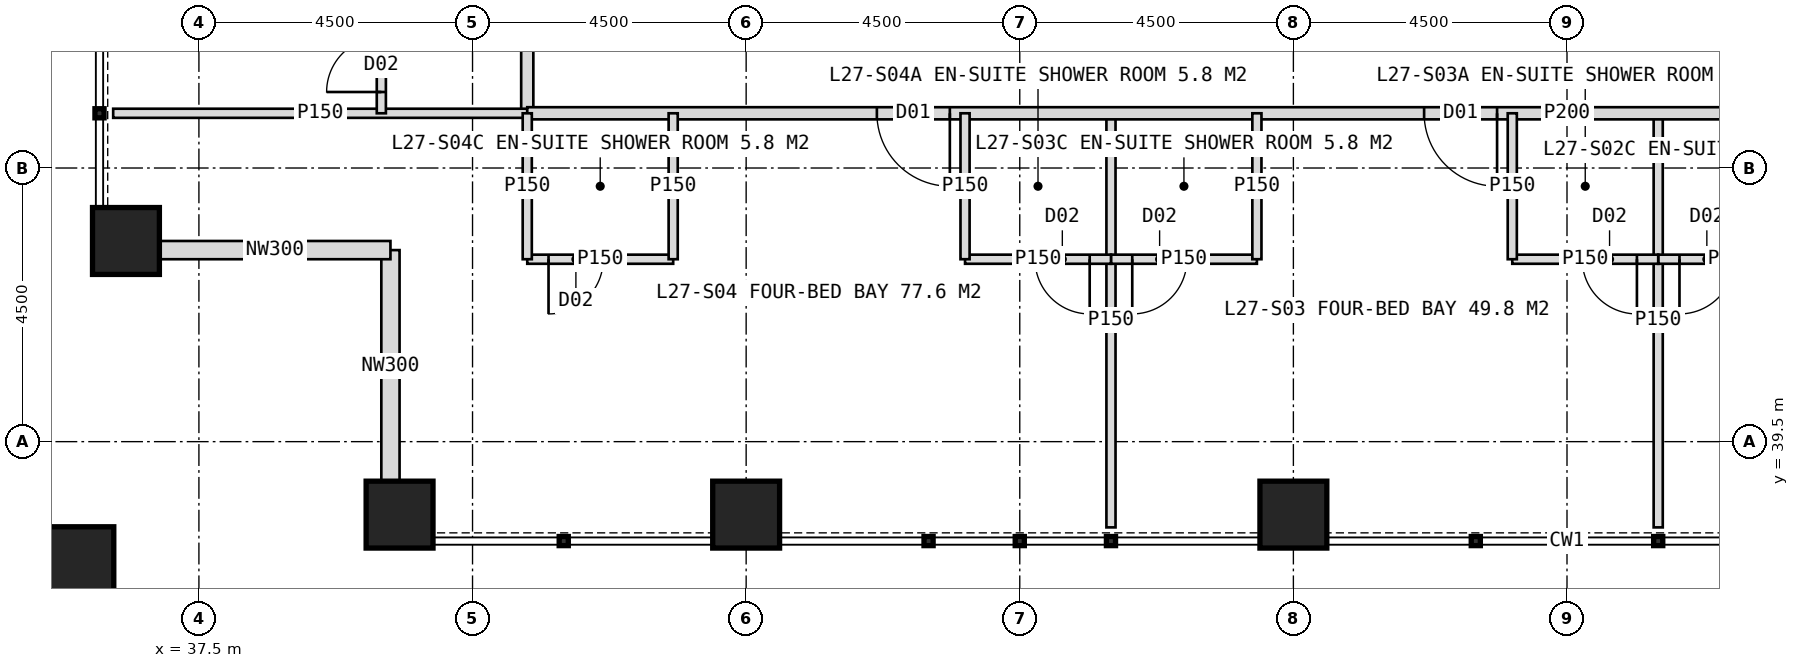
"""IFC4 building model, lengths in metres.
Left out: names, types, materials, properties, quantities, classifications, styles, units other than length and angle.
Written with IfcOpenShell. Run it as: python <this file> out.ifc"""

import sys

from ifc_helpers import new_model, si_unit, direction, frame, frame_2d, origin, origin_2d, place, context, subcontext, project, spatial, rectangle, hollow_rectangle, extrude, element, fill, save


model = new_model("IFC4")
c1 = context("Model", 3, precision=1e-05, world=origin(), true_north=direction((0.0, 1.0)))
c2 = subcontext(c1, "Body", "Model", "MODEL_VIEW")
j1 = project(units=[si_unit("LENGTHUNIT", "METRE"), si_unit("PLANEANGLEUNIT", "RADIAN")], contexts=[c1])
p1 = place(None, origin())
s1 = spatial("IfcSite", under=j1, at=p1, CompositionType="ELEMENT")
p2 = place(p1, origin())
s2 = spatial("IfcBuilding", under=s1, at=p2, CompositionType="ELEMENT")
p3 = place(p2, frame((0.0, 0.0, 116.0)))
s3 = spatial("IfcBuildingStorey", under=s2, at=p3, CompositionType="ELEMENT", Elevation=116.0)
for number, where, z_axis, x_axis in (
    (1, (40.8, 38.3, 0.0), (0.0, 0.0, 1.0), (1.0, 0.0, 0.0)),
    (2, (36.3, 42.8, 0.0), (0.0, 0.0, 1.0), (1.0, 0.0, 0.0)),
    (3, (46.5, 38.3, 0.0), (0.0, 0.0, 1.0), (1.0, 0.0, 0.0)),
    (4, (55.5, 38.3, 0.0), (0.0, 0.0, 1.0), (1.0, 0.0, 0.0)),
):
    element("IfcColumn", number, at=place(p3, frame(where, z_axis=z_axis, x_axis=x_axis)), inside=s3, PredefinedType="COLUMN", context=c2, shape_type="SweptSolid", body=[
        extrude(hollow_rectangle(XDim=1.1, YDim=1.1, WallThickness=0.1, at=origin_2d()), origin(), (0.0, 0.0, 1.0), 4.0),
    ])
p4 = place(p3, frame((35.4, 37.4, 0.0), z_axis=(0.0, 0.0, 1.0), x_axis=(1.0, 0.0, 0.0)))
e5 = element("IfcColumn", 5, at=p4, inside=s3, PredefinedType="COLUMN", context=c2, shape_type="SweptSolid", body=[
    extrude(hollow_rectangle(XDim=1.4, YDim=1.4, WallThickness=0.08, at=origin_2d()), origin(), (0.0, 0.0, 1.0), 4.0),
])
for number, where, z_axis, x_axis in (
    (6, (40.65, 38.85, 0.0), (0.0, 0.0, 1.0), (0.0, 1.0, 0.0)),
    (7, (40.65, 42.65, 0.0), (0.0, 0.0, 1.0), (-1.0, 0.0, 0.0)),
):
    element("IfcWall", number, at=place(p3, frame(where, z_axis=z_axis, x_axis=x_axis)), inside=s3, PredefinedType="ELEMENTEDWALL", context=c2, shape_type="SweptSolid", body=[
        extrude(rectangle(XDim=3.8, YDim=0.3, at=frame_2d((1.9, 0.0))), origin(), (0.0, 0.0, 1.0), 4.0),
    ])
p5 = place(p3, frame((42.9, 44.9, 0.0), z_axis=(0.0, 0.0, 1.0), x_axis=(0.0, 1.0, 0.0)))
e8 = element("IfcWall", 8, at=p5, inside=s3, PredefinedType="PARTITIONING", context=c2, shape_type="SweptSolid", body=[
    extrude(rectangle(XDim=34.2, YDim=0.2, at=frame_2d((17.1, 0.0))), origin(), (0.0, 0.0, 1.0), 3.75),
])
p6 = place(p5, frame((3.25, 0.0, 0.0)))
e9 = element("IfcOpeningElement", 9, at=p6, cuts=e8, PredefinedType="OPENING", context=c2, shape_type="SweptSolid", body=[
    extrude(rectangle(XDim=1.2, YDim=2.2, at=frame_2d((0.6, 1.1))), frame((0.0, 0.11, 0.0), z_axis=(0.0, -1.0, 0.0), x_axis=(1.0, 0.0, 0.0)), (0.0, 0.0, 1.0), 0.22),
])
p7 = place(p5, frame((10.75, 0.0, 0.0)))
e10 = element("IfcOpeningElement", 10, at=p7, cuts=e8, PredefinedType="OPENING", context=c2, shape_type="SweptSolid", body=[
    extrude(rectangle(XDim=1.2, YDim=2.2, at=frame_2d((0.6, 1.1))), frame((0.0, 0.11, 0.0), z_axis=(0.0, -1.0, 0.0), x_axis=(1.0, 0.0, 0.0)), (0.0, 0.0, 1.0), 0.22),
])
p8 = place(p5, frame((19.75, 0.0, 0.0)))
e11 = element("IfcOpeningElement", 11, at=p8, cuts=e8, PredefinedType="OPENING", context=c2, shape_type="SweptSolid", body=[
    extrude(rectangle(XDim=1.2, YDim=2.2, at=frame_2d((0.6, 1.1))), frame((0.0, 0.11, 0.0), z_axis=(0.0, -1.0, 0.0), x_axis=(1.0, 0.0, 0.0)), (0.0, 0.0, 1.0), 0.22),
])
p9 = place(p5, frame((28.75, 0.0, 0.0)))
e12 = element("IfcOpeningElement", 12, at=p9, cuts=e8, PredefinedType="OPENING", context=c2, shape_type="SweptSolid", body=[
    extrude(rectangle(XDim=1.2, YDim=2.2, at=frame_2d((0.6, 1.1))), frame((0.0, 0.11, 0.0), z_axis=(0.0, -1.0, 0.0), x_axis=(1.0, 0.0, 0.0)), (0.0, 0.0, 1.0), 0.22),
])
p10 = place(p3, frame((42.9, 44.9, 0.0), z_axis=(0.0, 0.0, 1.0), x_axis=(-1.0, 0.0, 0.0)))
e13 = element("IfcWall", 13, at=p10, inside=s3, PredefinedType="PARTITIONING", context=c2, shape_type="SweptSolid", body=[
    extrude(rectangle(XDim=6.81, YDim=0.15, at=frame_2d((3.405, 0.0))), origin(), (0.0, 0.0, 1.0), 3.75),
])
p11 = place(p3, frame((40.5, 44.9, 0.0), z_axis=(0.0, 0.0, 1.0), x_axis=(0.0, 1.0, 0.0)))
e14 = element("IfcWall", 14, at=p11, inside=s3, PredefinedType="PARTITIONING", context=c2, shape_type="SweptSolid", body=[
    extrude(rectangle(XDim=3.0, YDim=0.15, at=frame_2d((1.5, 0.0))), origin(), (0.0, 0.0, 1.0), 3.75),
])
p12 = place(p11, frame((0.35, 0.0, 0.0)))
e15 = element("IfcOpeningElement", 15, at=p12, cuts=e14, PredefinedType="OPENING", context=c2, shape_type="SweptSolid", body=[
    extrude(rectangle(XDim=0.9, YDim=2.1, at=frame_2d((0.45, 1.05))), frame((0.0, 0.085, 0.0), z_axis=(0.0, -1.0, 0.0), x_axis=(1.0, 0.0, 0.0)), (0.0, 0.0, 1.0), 0.17),
])
for number, where, z_axis, x_axis in (
    (16, (61.5, 44.9, 0.0), (0.0, 0.0, 1.0), (0.0, -1.0, 0.0)),
    (17, (52.5, 44.9, 0.0), (0.0, 0.0, 1.0), (0.0, -1.0, 0.0)),
):
    element("IfcWall", number, at=place(p3, frame(where, z_axis=z_axis, x_axis=x_axis)), inside=s3, PredefinedType="PARTITIONING", context=c2, shape_type="SweptSolid", body=[
        extrude(rectangle(XDim=6.81, YDim=0.15, at=frame_2d((3.405, 0.0))), origin(), (0.0, 0.0, 1.0), 3.75),
    ])
p13 = place(p3, frame((77.1, 44.9, 0.0), z_axis=(0.0, 0.0, 1.0), x_axis=(-1.0, 0.0, 0.0)))
e18 = element("IfcWall", 18, at=p13, inside=s3, PredefinedType="PARTITIONING", context=c2, shape_type="SweptSolid", body=[
    extrude(rectangle(XDim=34.2, YDim=0.2, at=frame_2d((17.1, 0.0))), origin(), (0.0, 0.0, 1.0), 3.75),
])
p14 = place(p13, frame((3.25, 0.0, 0.0)))
e19 = element("IfcOpeningElement", 19, at=p14, cuts=e18, PredefinedType="OPENING", context=c2, shape_type="SweptSolid", body=[
    extrude(rectangle(XDim=1.2, YDim=2.2, at=frame_2d((0.6, 1.1))), frame((0.0, 0.11, 0.0), z_axis=(0.0, -1.0, 0.0), x_axis=(1.0, 0.0, 0.0)), (0.0, 0.0, 1.0), 0.22),
])
p15 = place(p13, frame((9.25, 0.0, 0.0)))
e20 = element("IfcOpeningElement", 20, at=p15, cuts=e18, PredefinedType="OPENING", context=c2, shape_type="SweptSolid", body=[
    extrude(rectangle(XDim=1.2, YDim=2.2, at=frame_2d((0.6, 1.1))), frame((0.0, 0.11, 0.0), z_axis=(0.0, -1.0, 0.0), x_axis=(1.0, 0.0, 0.0)), (0.0, 0.0, 1.0), 0.22),
])
p16 = place(p13, frame((18.25, 0.0, 0.0)))
e21 = element("IfcOpeningElement", 21, at=p16, cuts=e18, PredefinedType="OPENING", context=c2, shape_type="SweptSolid", body=[
    extrude(rectangle(XDim=1.2, YDim=2.2, at=frame_2d((0.6, 1.1))), frame((0.0, 0.11, 0.0), z_axis=(0.0, -1.0, 0.0), x_axis=(1.0, 0.0, 0.0)), (0.0, 0.0, 1.0), 0.22),
])
p17 = place(p13, frame((27.25, 0.0, 0.0)))
e22 = element("IfcOpeningElement", 22, at=p17, cuts=e18, PredefinedType="OPENING", context=c2, shape_type="SweptSolid", body=[
    extrude(rectangle(XDim=1.2, YDim=2.2, at=frame_2d((0.6, 1.1))), frame((0.0, 0.11, 0.0), z_axis=(0.0, -1.0, 0.0), x_axis=(1.0, 0.0, 0.0)), (0.0, 0.0, 1.0), 0.22),
])
p18 = place(p3, frame((63.9, 42.5, 0.0), z_axis=(0.0, 0.0, 1.0), x_axis=(-1.0, 0.0, 0.0)))
e23 = element("IfcWall", 23, at=p18, inside=s3, PredefinedType="PARTITIONING", context=c2, shape_type="SweptSolid", body=[
    extrude(rectangle(XDim=2.4, YDim=0.15, at=frame_2d((1.2, 0.0))), origin(), (0.0, 0.0, 1.0), 3.75),
])
p19 = place(p18, frame((1.15, 0.0, 0.0)))
e24 = element("IfcOpeningElement", 24, at=p19, cuts=e23, PredefinedType="OPENING", context=c2, shape_type="SweptSolid", body=[
    extrude(rectangle(XDim=0.9, YDim=2.1, at=frame_2d((0.45, 1.05))), frame((0.0, 0.085, 0.0), z_axis=(0.0, -1.0, 0.0), x_axis=(1.0, 0.0, 0.0)), (0.0, 0.0, 1.0), 0.17),
])
p20 = place(p3, frame((61.5, 42.5, 0.0), z_axis=(0.0, 0.0, 1.0), x_axis=(-1.0, 0.0, 0.0)))
e25 = element("IfcWall", 25, at=p20, inside=s3, PredefinedType="PARTITIONING", context=c2, shape_type="SweptSolid", body=[
    extrude(rectangle(XDim=2.4, YDim=0.15, at=frame_2d((1.2, 0.0))), origin(), (0.0, 0.0, 1.0), 3.75),
])
p21 = place(p20, frame((0.35, 0.0, 0.0)))
e26 = element("IfcOpeningElement", 26, at=p21, cuts=e25, PredefinedType="OPENING", context=c2, shape_type="SweptSolid", body=[
    extrude(rectangle(XDim=0.9, YDim=2.1, at=frame_2d((0.45, 1.05))), frame((0.0, 0.085, 0.0), z_axis=(0.0, -1.0, 0.0), x_axis=(1.0, 0.0, 0.0)), (0.0, 0.0, 1.0), 0.17),
])
p22 = place(p3, frame((59.1, 44.9, 0.0), z_axis=(0.0, 0.0, 1.0), x_axis=(0.0, -1.0, 0.0)))
e27 = element("IfcWall", 27, at=p22, inside=s3, PredefinedType="PARTITIONING", context=c2, shape_type="SweptSolid", body=[
    extrude(rectangle(XDim=2.4, YDim=0.15, at=frame_2d((1.2, 0.0))), origin(), (0.0, 0.0, 1.0), 3.75),
])
p23 = place(p3, frame((54.9, 42.5, 0.0), z_axis=(0.0, 0.0, 1.0), x_axis=(-1.0, 0.0, 0.0)))
e28 = element("IfcWall", 28, at=p23, inside=s3, PredefinedType="PARTITIONING", context=c2, shape_type="SweptSolid", body=[
    extrude(rectangle(XDim=2.4, YDim=0.15, at=frame_2d((1.2, 0.0))), origin(), (0.0, 0.0, 1.0), 3.75),
])
p24 = place(p23, frame((1.15, 0.0, 0.0)))
e29 = element("IfcOpeningElement", 29, at=p24, cuts=e28, PredefinedType="OPENING", context=c2, shape_type="SweptSolid", body=[
    extrude(rectangle(XDim=0.9, YDim=2.1, at=frame_2d((0.45, 1.05))), frame((0.0, 0.085, 0.0), z_axis=(0.0, -1.0, 0.0), x_axis=(1.0, 0.0, 0.0)), (0.0, 0.0, 1.0), 0.17),
])
p25 = place(p3, frame((54.9, 44.9, 0.0), z_axis=(0.0, 0.0, 1.0), x_axis=(0.0, -1.0, 0.0)))
e30 = element("IfcWall", 30, at=p25, inside=s3, PredefinedType="PARTITIONING", context=c2, shape_type="SweptSolid", body=[
    extrude(rectangle(XDim=2.4, YDim=0.15, at=frame_2d((1.2, 0.0))), origin(), (0.0, 0.0, 1.0), 3.75),
])
p26 = place(p3, frame((52.5, 42.5, 0.0), z_axis=(0.0, 0.0, 1.0), x_axis=(-1.0, 0.0, 0.0)))
e31 = element("IfcWall", 31, at=p26, inside=s3, PredefinedType="PARTITIONING", context=c2, shape_type="SweptSolid", body=[
    extrude(rectangle(XDim=2.4, YDim=0.15, at=frame_2d((1.2, 0.0))), origin(), (0.0, 0.0, 1.0), 3.75),
])
p27 = place(p26, frame((0.35, 0.0, 0.0)))
e32 = element("IfcOpeningElement", 32, at=p27, cuts=e31, PredefinedType="OPENING", context=c2, shape_type="SweptSolid", body=[
    extrude(rectangle(XDim=0.9, YDim=2.1, at=frame_2d((0.45, 1.05))), frame((0.0, 0.085, 0.0), z_axis=(0.0, -1.0, 0.0), x_axis=(1.0, 0.0, 0.0)), (0.0, 0.0, 1.0), 0.17),
])
p28 = place(p3, frame((50.1, 44.9, 0.0), z_axis=(0.0, 0.0, 1.0), x_axis=(0.0, -1.0, 0.0)))
e33 = element("IfcWall", 33, at=p28, inside=s3, PredefinedType="PARTITIONING", context=c2, shape_type="SweptSolid", body=[
    extrude(rectangle(XDim=2.4, YDim=0.15, at=frame_2d((1.2, 0.0))), origin(), (0.0, 0.0, 1.0), 3.75),
])
p29 = place(p3, frame((45.3, 42.5, 0.0), z_axis=(0.0, 0.0, 1.0), x_axis=(-1.0, 0.0, 0.0)))
e34 = element("IfcWall", 34, at=p29, inside=s3, PredefinedType="PARTITIONING", context=c2, shape_type="SweptSolid", body=[
    extrude(rectangle(XDim=2.4, YDim=0.15, at=frame_2d((1.2, 0.0))), origin(), (0.0, 0.0, 1.0), 3.75),
])
p30 = place(p29, frame((1.15, 0.0, 0.0)))
e35 = element("IfcOpeningElement", 35, at=p30, cuts=e34, PredefinedType="OPENING", context=c2, shape_type="SweptSolid", body=[
    extrude(rectangle(XDim=0.9, YDim=2.1, at=frame_2d((0.45, 1.05))), frame((0.0, 0.085, 0.0), z_axis=(0.0, -1.0, 0.0), x_axis=(1.0, 0.0, 0.0)), (0.0, 0.0, 1.0), 0.17),
])
for number, where, z_axis, x_axis in (
    (36, (45.3, 44.9, 0.0), (0.0, 0.0, 1.0), (0.0, -1.0, 0.0)),
    (37, (42.9, 44.9, 0.0), (0.0, 0.0, 1.0), (0.0, -1.0, 0.0)),
):
    element("IfcWall", number, at=place(p3, frame(where, z_axis=z_axis, x_axis=x_axis)), inside=s3, PredefinedType="PARTITIONING", context=c2, shape_type="SweptSolid", body=[
        extrude(rectangle(XDim=2.4, YDim=0.15, at=frame_2d((1.2, 0.0))), origin(), (0.0, 0.0, 1.0), 3.75),
    ])
p31 = place(p12, origin())
e38 = element("IfcDoor", 38, at=p31, inside=s3, OperationType="SINGLE_SWING_LEFT", PredefinedType="DOOR", context=c2, shape_type="SweptSolid", body=[
    extrude(rectangle(XDim=0.9, YDim=2.1, at=frame_2d((0.45, 1.05))), frame((0.0, 0.025, 0.0), z_axis=(0.0, -1.0, 0.0), x_axis=(1.0, 0.0, 0.0)), (0.0, 0.0, 1.0), 0.05),
])
fill(e15, e38)
p32 = place(p19, origin())
e39 = element("IfcDoor", 39, at=p32, inside=s3, OperationType="SINGLE_SWING_RIGHT", PredefinedType="DOOR", context=c2, shape_type="SweptSolid", body=[
    extrude(rectangle(XDim=0.9, YDim=2.1, at=frame_2d((0.45, 1.05))), frame((0.0, 0.025, 0.0), z_axis=(0.0, -1.0, 0.0), x_axis=(1.0, 0.0, 0.0)), (0.0, 0.0, 1.0), 0.05),
])
fill(e24, e39)
p33 = place(p16, origin())
e40 = element("IfcDoor", 40, at=p33, inside=s3, OperationType="SINGLE_SWING_LEFT", PredefinedType="DOOR", context=c2, shape_type="SweptSolid", body=[
    extrude(rectangle(XDim=1.2, YDim=2.2, at=frame_2d((0.6, 1.1))), frame((0.0, 0.025, 0.0), z_axis=(0.0, -1.0, 0.0), x_axis=(1.0, 0.0, 0.0)), (0.0, 0.0, 1.0), 0.05),
])
fill(e21, e40)
p34 = place(p21, origin())
e41 = element("IfcDoor", 41, at=p34, inside=s3, OperationType="SINGLE_SWING_LEFT", PredefinedType="DOOR", context=c2, shape_type="SweptSolid", body=[
    extrude(rectangle(XDim=0.9, YDim=2.1, at=frame_2d((0.45, 1.05))), frame((0.0, 0.025, 0.0), z_axis=(0.0, -1.0, 0.0), x_axis=(1.0, 0.0, 0.0)), (0.0, 0.0, 1.0), 0.05),
])
fill(e26, e41)
p35 = place(p24, origin())
e42 = element("IfcDoor", 42, at=p35, inside=s3, OperationType="SINGLE_SWING_RIGHT", PredefinedType="DOOR", context=c2, shape_type="SweptSolid", body=[
    extrude(rectangle(XDim=0.9, YDim=2.1, at=frame_2d((0.45, 1.05))), frame((0.0, 0.025, 0.0), z_axis=(0.0, -1.0, 0.0), x_axis=(1.0, 0.0, 0.0)), (0.0, 0.0, 1.0), 0.05),
])
fill(e29, e42)
p36 = place(p17, origin())
e43 = element("IfcDoor", 43, at=p36, inside=s3, OperationType="SINGLE_SWING_LEFT", PredefinedType="DOOR", context=c2, shape_type="SweptSolid", body=[
    extrude(rectangle(XDim=1.2, YDim=2.2, at=frame_2d((0.6, 1.1))), frame((0.0, 0.025, 0.0), z_axis=(0.0, -1.0, 0.0), x_axis=(1.0, 0.0, 0.0)), (0.0, 0.0, 1.0), 0.05),
])
fill(e22, e43)
p37 = place(p27, origin())
e44 = element("IfcDoor", 44, at=p37, inside=s3, OperationType="SINGLE_SWING_LEFT", PredefinedType="DOOR", context=c2, shape_type="SweptSolid", body=[
    extrude(rectangle(XDim=0.9, YDim=2.1, at=frame_2d((0.45, 1.05))), frame((0.0, 0.025, 0.0), z_axis=(0.0, -1.0, 0.0), x_axis=(1.0, 0.0, 0.0)), (0.0, 0.0, 1.0), 0.05),
])
fill(e32, e44)
p38 = place(p30, origin())
e45 = element("IfcDoor", 45, at=p38, inside=s3, OperationType="SINGLE_SWING_RIGHT", PredefinedType="DOOR", context=c2, shape_type="SweptSolid", body=[
    extrude(rectangle(XDim=0.9, YDim=2.1, at=frame_2d((0.45, 1.05))), frame((0.0, 0.025, 0.0), z_axis=(0.0, -1.0, 0.0), x_axis=(1.0, 0.0, 0.0)), (0.0, 0.0, 1.0), 0.05),
])
fill(e35, e45)
save(model, sys.argv[1])
